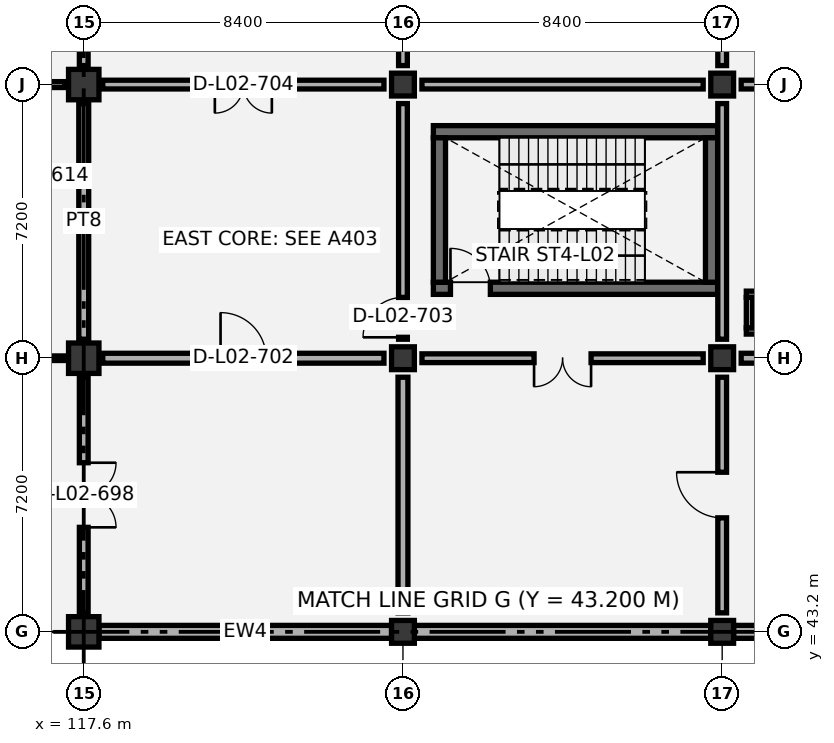
"""IFC4 building model, lengths in metres.
Left out: names, types, materials, properties, quantities, classifications, styles, units other than length and angle.
Written with IfcOpenShell. Run it as: python <this file> out.ifc"""

import sys

from ifc_helpers import new_model, si_unit, direction, frame, frame_2d, origin, origin_2d, place, context, subcontext, project, spatial, rectangle, extrude, element, fill, save


model = new_model("IFC4")
c1 = context("Model", 3, precision=1e-05, world=origin(), true_north=direction((0.0, 1.0)))
c2 = subcontext(c1, "Body", "Model", "MODEL_VIEW")
j1 = project(units=[si_unit("LENGTHUNIT", "METRE"), si_unit("PLANEANGLEUNIT", "RADIAN")], contexts=[c1])
p1 = place(None, origin())
s1 = spatial("IfcSite", under=j1, at=p1, CompositionType="ELEMENT")
p2 = place(p1, origin())
s2 = spatial("IfcBuilding", under=s1, at=p2, CompositionType="ELEMENT")
p3 = place(p2, frame((0.0, 0.0, 11.4)))
s3 = spatial("IfcBuildingStorey", under=s2, at=p3, CompositionType="ELEMENT", Elevation=11.4)
for number, where, z_axis, x_axis in (
    (1, (117.6, 43.2, 0.0), (0.0, 0.0, 1.0), (1.0, 0.0, 0.0)),
    (2, (117.6, 50.4, 0.0), (0.0, 0.0, 1.0), (1.0, 0.0, 0.0)),
    (3, (117.6, 57.6, 0.0), (0.0, 0.0, 1.0), (1.0, 0.0, 0.0)),
):
    element("IfcColumn", number, at=place(p3, frame(where, z_axis=z_axis, x_axis=x_axis)), inside=s3, PredefinedType="COLUMN", context=c2, shape_type="SweptSolid", body=[
        extrude(rectangle(XDim=0.8, YDim=0.8, at=origin_2d()), origin(), (0.0, 0.0, 1.0), 5.4),
    ])
for number, where, z_axis, x_axis in (
    (4, (126.0, 43.2, 0.0), (0.0, 0.0, 1.0), (1.0, 0.0, 0.0)),
    (5, (126.0, 50.4, 0.0), (0.0, 0.0, 1.0), (1.0, 0.0, 0.0)),
    (6, (126.0, 57.6, 0.0), (0.0, 0.0, 1.0), (1.0, 0.0, 0.0)),
    (7, (134.4, 43.2, 0.0), (0.0, 0.0, 1.0), (1.0, 0.0, 0.0)),
    (8, (134.4, 50.4, 0.0), (0.0, 0.0, 1.0), (1.0, 0.0, 0.0)),
    (9, (134.4, 57.6, 0.0), (0.0, 0.0, 1.0), (1.0, 0.0, 0.0)),
):
    element("IfcColumn", number, at=place(p3, frame(where, z_axis=z_axis, x_axis=x_axis)), inside=s3, PredefinedType="COLUMN", context=c2, shape_type="SweptSolid", body=[
        extrude(rectangle(XDim=0.6, YDim=0.6, at=origin_2d()), origin(), (0.0, 0.0, 1.0), 5.4),
    ])
p4 = place(p3, frame((126.8, 52.24, 0.0), z_axis=(0.0, 0.0, 1.0), x_axis=(1.0, 0.0, 0.0)))
e10 = element("IfcWall", 10, at=p4, inside=s3, PredefinedType="SHEAR", context=c2, shape_type="SweptSolid", body=[
    extrude(rectangle(XDim=7.48, YDim=0.32, at=frame_2d((3.74, 0.0))), origin(), (0.0, 0.0, 1.0), 5.1),
])
p5 = place(p4, frame((0.45, 0.0, 0.0)))
e11 = element("IfcOpeningElement", 11, at=p5, cuts=e10, PredefinedType="OPENING", context=c2, shape_type="SweptSolid", body=[
    extrude(rectangle(XDim=1.05, YDim=2.15, at=frame_2d((0.525, 1.075))), frame((0.0, 0.17, 0.0), z_axis=(0.0, -1.0, 0.0), x_axis=(1.0, 0.0, 0.0)), (0.0, 0.0, 1.0), 0.34),
])
p6 = place(p3, frame((126.8, 56.36, 0.0), z_axis=(0.0, 0.0, 1.0), x_axis=(1.0, 0.0, 0.0)))
e12 = element("IfcWall", 12, at=p6, inside=s3, PredefinedType="SHEAR", context=c2, shape_type="SweptSolid", body=[
    extrude(rectangle(XDim=7.48, YDim=0.32, at=frame_2d((3.74, 0.0))), origin(), (0.0, 0.0, 1.0), 5.1),
])
for number, where, z_axis, x_axis in (
    (13, (126.96, 52.4, 0.0), (0.0, 0.0, 1.0), (0.0, 1.0, 0.0)),
    (14, (134.12, 52.4, 0.0), (0.0, 0.0, 1.0), (0.0, 1.0, 0.0)),
):
    element("IfcWall", number, at=place(p3, frame(where, z_axis=z_axis, x_axis=x_axis)), inside=s3, PredefinedType="SHEAR", context=c2, shape_type="SweptSolid", body=[
        extrude(rectangle(XDim=3.8, YDim=0.32, at=frame_2d((1.9, 0.0))), origin(), (0.0, 0.0, 1.0), 5.1),
    ])
p7 = place(p3, frame((118.0, 43.2, 0.0), z_axis=(0.0, 0.0, 1.0), x_axis=(1.0, 0.0, 0.0)))
e15 = element("IfcWall", 15, at=p7, inside=s3, PredefinedType="SOLIDWALL", context=c2, shape_type="SweptSolid", body=[
    extrude(rectangle(XDim=7.7, YDim=0.34, at=frame_2d((3.85, 0.0))), origin(), (0.0, 0.0, 1.0), 4.445),
])
for number, where, z_axis, x_axis in (
    (16, (126.3, 43.2, 0.0), (0.0, 0.0, 1.0), (1.0, 0.0, 0.0)),
    (17, (134.7, 43.2, 0.0), (0.0, 0.0, 1.0), (1.0, 0.0, 0.0)),
):
    element("IfcWall", number, at=place(p3, frame(where, z_axis=z_axis, x_axis=x_axis)), inside=s3, PredefinedType="SOLIDWALL", context=c2, shape_type="SweptSolid", body=[
        extrude(rectangle(XDim=7.8, YDim=0.34, at=frame_2d((3.9, 0.0))), origin(), (0.0, 0.0, 1.0), 4.445),
    ])
for number, where, z_axis, x_axis in (
    (18, (135.035, 51.117, 0.0), (0.0, 0.0, 1.0), (1.0, 0.0, 0.0)),
    (19, (135.035, 52.083, 0.0), (0.0, 0.0, 1.0), (1.0, 0.0, 0.0)),
):
    element("IfcWall", number, at=place(p3, frame(where, z_axis=z_axis, x_axis=x_axis)), inside=s3, PredefinedType="PARTITIONING", context=c2, shape_type="SweptSolid", body=[
        extrude(rectangle(XDim=1.43, YDim=0.165, at=frame_2d((0.715, 0.0))), origin(), (0.0, 0.0, 1.0), 5.1),
    ])
p8 = place(p3, frame((135.117, 51.2, 0.0), z_axis=(0.0, 0.0, 1.0), x_axis=(0.0, 1.0, 0.0)))
e20 = element("IfcWall", 20, at=p8, inside=s3, PredefinedType="PARTITIONING", context=c2, shape_type="SweptSolid", body=[
    extrude(rectangle(XDim=0.8, YDim=0.165, at=frame_2d((0.4, 0.0))), origin(), (0.0, 0.0, 1.0), 5.1),
])
p9 = place(p3, frame((109.35, 55.2, 0.0), z_axis=(0.0, 0.0, 1.0), x_axis=(1.0, 0.0, 0.0)))
e21 = element("IfcWall", 21, at=p9, inside=s3, PredefinedType="PARTITIONING", context=c2, shape_type="SweptSolid", body=[
    extrude(rectangle(XDim=8.1, YDim=0.12, at=frame_2d((4.05, 0.0))), origin(), (0.0, 0.0, 1.0), 5.1),
])
p10 = place(p9, frame((1.08, 0.0, 0.0)))
e22 = element("IfcOpeningElement", 22, at=p10, cuts=e21, PredefinedType="OPENING", context=c2, shape_type="SweptSolid", body=[
    extrude(rectangle(XDim=0.95, YDim=2.1, at=frame_2d((0.475, 1.05))), frame((0.0, 0.07, 0.0), z_axis=(0.0, -1.0, 0.0), x_axis=(1.0, 0.0, 0.0)), (0.0, 0.0, 1.0), 0.14),
])
p11 = place(p9, frame((3.63, 0.0, 0.0)))
e23 = element("IfcOpeningElement", 23, at=p11, cuts=e21, PredefinedType="OPENING", context=c2, shape_type="SweptSolid", body=[
    extrude(rectangle(XDim=0.9, YDim=2.1, at=frame_2d((0.45, 1.05))), frame((0.0, 0.07, 0.0), z_axis=(0.0, -1.0, 0.0), x_axis=(1.0, 0.0, 0.0)), (0.0, 0.0, 1.0), 0.14),
])
p12 = place(p9, frame((6.13, 0.0, 0.0)))
e24 = element("IfcOpeningElement", 24, at=p12, cuts=e21, PredefinedType="OPENING", context=c2, shape_type="SweptSolid", body=[
    extrude(rectangle(XDim=1.0, YDim=2.1, at=frame_2d((0.5, 1.05))), frame((0.0, 0.07, 0.0), z_axis=(0.0, -1.0, 0.0), x_axis=(1.0, 0.0, 0.0)), (0.0, 0.0, 1.0), 0.14),
])
p13 = place(p3, frame((117.6, 43.7, 0.0), z_axis=(0.0, 0.0, 1.0), x_axis=(0.0, 1.0, 0.0)))
e25 = element("IfcWall", 25, at=p13, inside=s3, PredefinedType="PARTITIONING", context=c2, shape_type="SweptSolid", body=[
    extrude(rectangle(XDim=6.2, YDim=0.23, at=frame_2d((3.1, 0.0))), origin(), (0.0, 0.0, 1.0), 4.595),
])
p14 = place(p13, frame((2.25, 0.0, 0.0)))
e26 = element("IfcOpeningElement", 26, at=p14, cuts=e25, PredefinedType="OPENING", context=c2, shape_type="SweptSolid", body=[
    extrude(rectangle(XDim=1.7, YDim=2.25, at=frame_2d((0.85, 1.125))), frame((0.0, 0.125, 0.0), z_axis=(0.0, -1.0, 0.0), x_axis=(1.0, 0.0, 0.0)), (0.0, 0.0, 1.0), 0.25),
])
p15 = place(p3, frame((109.7, 50.4, 0.0), z_axis=(0.0, 0.0, 1.0), x_axis=(1.0, 0.0, 0.0)))
e27 = element("IfcWall", 27, at=p15, inside=s3, PredefinedType="PARTITIONING", context=c2, shape_type="SweptSolid", body=[
    extrude(rectangle(XDim=7.4, YDim=0.12, at=frame_2d((3.7, 0.0))), origin(), (0.0, 0.0, 1.0), 4.345),
])
p16 = place(p3, frame((117.6, 50.9, 0.0), z_axis=(0.0, 0.0, 1.0), x_axis=(0.0, 1.0, 0.0)))
e28 = element("IfcWall", 28, at=p16, inside=s3, PredefinedType="PARTITIONING", context=c2, shape_type="SweptSolid", body=[
    extrude(rectangle(XDim=6.2, YDim=0.26, at=frame_2d((3.1, 0.0))), origin(), (0.0, 0.0, 1.0), 4.395),
])
p17 = place(p3, frame((109.7, 57.6, 0.0), z_axis=(0.0, 0.0, 1.0), x_axis=(1.0, 0.0, 0.0)))
e29 = element("IfcWall", 29, at=p17, inside=s3, PredefinedType="PARTITIONING", context=c2, shape_type="SweptSolid", body=[
    extrude(rectangle(XDim=7.4, YDim=0.155, at=frame_2d((3.7, 0.0))), origin(), (0.0, 0.0, 1.0), 4.345),
])
p18 = place(p17, frame((3.0, 0.0, 0.0)))
e30 = element("IfcOpeningElement", 30, at=p18, cuts=e29, PredefinedType="OPENING", context=c2, shape_type="SweptSolid", body=[
    extrude(rectangle(XDim=1.4, YDim=2.15, at=frame_2d((0.7, 1.075))), frame((0.0, 0.087, 0.0), z_axis=(0.0, -1.0, 0.0), x_axis=(1.0, 0.0, 0.0)), (0.0, 0.0, 1.0), 0.175),
])
p19 = place(p3, frame((117.6, 58.1, 0.0), z_axis=(0.0, 0.0, 1.0), x_axis=(0.0, 1.0, 0.0)))
e31 = element("IfcWall", 31, at=p19, inside=s3, PredefinedType="PARTITIONING", context=c2, shape_type="SweptSolid", body=[
    extrude(rectangle(XDim=6.2, YDim=0.23, at=frame_2d((3.1, 0.0))), origin(), (0.0, 0.0, 1.0), 4.695),
])
p20 = place(p3, frame((126.0, 43.7, 0.0), z_axis=(0.0, 0.0, 1.0), x_axis=(0.0, 1.0, 0.0)))
e32 = element("IfcWall", 32, at=p20, inside=s3, PredefinedType="PARTITIONING", context=c2, shape_type="SweptSolid", body=[
    extrude(rectangle(XDim=6.2, YDim=0.26, at=frame_2d((3.1, 0.0))), origin(), (0.0, 0.0, 1.0), 4.395),
])
p21 = place(p3, frame((118.1, 50.4, 0.0), z_axis=(0.0, 0.0, 1.0), x_axis=(1.0, 0.0, 0.0)))
e33 = element("IfcWall", 33, at=p21, inside=s3, PredefinedType="PARTITIONING", context=c2, shape_type="SweptSolid", body=[
    extrude(rectangle(XDim=7.4, YDim=0.26, at=frame_2d((3.7, 0.0))), origin(), (0.0, 0.0, 1.0), 4.345),
])
p22 = place(p21, frame((3.1, 0.0, 0.0)))
e34 = element("IfcOpeningElement", 34, at=p22, cuts=e33, PredefinedType="OPENING", context=c2, shape_type="SweptSolid", body=[
    extrude(rectangle(XDim=1.2, YDim=2.1, at=frame_2d((0.6, 1.05))), frame((0.0, 0.14, 0.0), z_axis=(0.0, -1.0, 0.0), x_axis=(1.0, 0.0, 0.0)), (0.0, 0.0, 1.0), 0.28),
])
p23 = place(p3, frame((126.0, 50.9, 0.0), z_axis=(0.0, 0.0, 1.0), x_axis=(0.0, 1.0, 0.0)))
e35 = element("IfcWall", 35, at=p23, inside=s3, PredefinedType="PARTITIONING", context=c2, shape_type="SweptSolid", body=[
    extrude(rectangle(XDim=6.2, YDim=0.23, at=frame_2d((3.1, 0.0))), origin(), (0.0, 0.0, 1.0), 4.695),
])
p24 = place(p23, frame((0.05, 0.0, 0.0)))
e36 = element("IfcOpeningElement", 36, at=p24, cuts=e35, PredefinedType="OPENING", context=c2, shape_type="SweptSolid", body=[
    extrude(rectangle(XDim=1.05, YDim=2.15, at=frame_2d((0.525, 1.075))), frame((0.0, 0.125, 0.0), z_axis=(0.0, -1.0, 0.0), x_axis=(1.0, 0.0, 0.0)), (0.0, 0.0, 1.0), 0.25),
])
p25 = place(p3, frame((118.1, 57.6, 0.0), z_axis=(0.0, 0.0, 1.0), x_axis=(1.0, 0.0, 0.0)))
e37 = element("IfcWall", 37, at=p25, inside=s3, PredefinedType="PARTITIONING", context=c2, shape_type="SweptSolid", body=[
    extrude(rectangle(XDim=7.4, YDim=0.23, at=frame_2d((3.7, 0.0))), origin(), (0.0, 0.0, 1.0), 4.345),
])
p26 = place(p25, frame((2.95, 0.0, 0.0)))
e38 = element("IfcOpeningElement", 38, at=p26, cuts=e37, PredefinedType="OPENING", context=c2, shape_type="SweptSolid", body=[
    extrude(rectangle(XDim=1.5, YDim=2.15, at=frame_2d((0.75, 1.075))), frame((0.0, 0.125, 0.0), z_axis=(0.0, -1.0, 0.0), x_axis=(1.0, 0.0, 0.0)), (0.0, 0.0, 1.0), 0.25),
])
p27 = place(p3, frame((126.0, 58.1, 0.0), z_axis=(0.0, 0.0, 1.0), x_axis=(0.0, 1.0, 0.0)))
e39 = element("IfcWall", 39, at=p27, inside=s3, PredefinedType="PARTITIONING", context=c2, shape_type="SweptSolid", body=[
    extrude(rectangle(XDim=6.2, YDim=0.23, at=frame_2d((3.1, 0.0))), origin(), (0.0, 0.0, 1.0), 4.395),
])
p28 = place(p3, frame((134.4, 43.7, 0.0), z_axis=(0.0, 0.0, 1.0), x_axis=(0.0, 1.0, 0.0)))
e40 = element("IfcWall", 40, at=p28, inside=s3, PredefinedType="PARTITIONING", context=c2, shape_type="SweptSolid", body=[
    extrude(rectangle(XDim=6.2, YDim=0.23, at=frame_2d((3.1, 0.0))), origin(), (0.0, 0.0, 1.0), 4.695),
])
p29 = place(p28, frame((2.5, 0.0, 0.0)))
e41 = element("IfcOpeningElement", 41, at=p29, cuts=e40, PredefinedType="OPENING", context=c2, shape_type="SweptSolid", body=[
    extrude(rectangle(XDim=1.2, YDim=2.1, at=frame_2d((0.6, 1.05))), frame((0.0, 0.125, 0.0), z_axis=(0.0, -1.0, 0.0), x_axis=(1.0, 0.0, 0.0)), (0.0, 0.0, 1.0), 0.25),
])
p30 = place(p3, frame((126.5, 50.4, 0.0), z_axis=(0.0, 0.0, 1.0), x_axis=(1.0, 0.0, 0.0)))
e42 = element("IfcWall", 42, at=p30, inside=s3, PredefinedType="PARTITIONING", context=c2, shape_type="SweptSolid", body=[
    extrude(rectangle(XDim=7.4, YDim=0.23, at=frame_2d((3.7, 0.0))), origin(), (0.0, 0.0, 1.0), 4.345),
])
p31 = place(p30, frame((2.95, 0.0, 0.0)))
e43 = element("IfcOpeningElement", 43, at=p31, cuts=e42, PredefinedType="OPENING", context=c2, shape_type="SweptSolid", body=[
    extrude(rectangle(XDim=1.5, YDim=2.15, at=frame_2d((0.75, 1.075))), frame((0.0, 0.125, 0.0), z_axis=(0.0, -1.0, 0.0), x_axis=(1.0, 0.0, 0.0)), (0.0, 0.0, 1.0), 0.25),
])
p32 = place(p3, frame((134.4, 50.9, 0.0), z_axis=(0.0, 0.0, 1.0), x_axis=(0.0, 1.0, 0.0)))
e44 = element("IfcWall", 44, at=p32, inside=s3, PredefinedType="PARTITIONING", context=c2, shape_type="SweptSolid", body=[
    extrude(rectangle(XDim=6.2, YDim=0.23, at=frame_2d((3.1, 0.0))), origin(), (0.0, 0.0, 1.0), 4.395),
])
p33 = place(p3, frame((126.5, 57.6, 0.0), z_axis=(0.0, 0.0, 1.0), x_axis=(1.0, 0.0, 0.0)))
e45 = element("IfcWall", 45, at=p33, inside=s3, PredefinedType="PARTITIONING", context=c2, shape_type="SweptSolid", body=[
    extrude(rectangle(XDim=7.4, YDim=0.23, at=frame_2d((3.7, 0.0))), origin(), (0.0, 0.0, 1.0), 4.345),
])
p34 = place(p3, frame((134.4, 58.1, 0.0), z_axis=(0.0, 0.0, 1.0), x_axis=(0.0, 1.0, 0.0)))
e46 = element("IfcWall", 46, at=p34, inside=s3, PredefinedType="PARTITIONING", context=c2, shape_type="SweptSolid", body=[
    extrude(rectangle(XDim=6.2, YDim=0.23, at=frame_2d((3.1, 0.0))), origin(), (0.0, 0.0, 1.0), 4.805),
])
p35 = place(p3, frame((134.9, 50.4, 0.0), z_axis=(0.0, 0.0, 1.0), x_axis=(1.0, 0.0, 0.0)))
e47 = element("IfcWall", 47, at=p35, inside=s3, PredefinedType="PARTITIONING", context=c2, shape_type="SweptSolid", body=[
    extrude(rectangle(XDim=7.4, YDim=0.26, at=frame_2d((3.7, 0.0))), origin(), (0.0, 0.0, 1.0), 4.345),
])
p36 = place(p3, frame((134.9, 57.6, 0.0), z_axis=(0.0, 0.0, 1.0), x_axis=(1.0, 0.0, 0.0)))
e48 = element("IfcWall", 48, at=p36, inside=s3, PredefinedType="PARTITIONING", context=c2, shape_type="SweptSolid", body=[
    extrude(rectangle(XDim=7.4, YDim=0.23, at=frame_2d((3.7, 0.0))), origin(), (0.0, 0.0, 1.0), 4.345),
])
p37 = place(p36, frame((3.1, 0.0, 0.0)))
e49 = element("IfcOpeningElement", 49, at=p37, cuts=e48, PredefinedType="OPENING", context=c2, shape_type="SweptSolid", body=[
    extrude(rectangle(XDim=1.2, YDim=2.1, at=frame_2d((0.6, 1.05))), frame((0.0, 0.125, 0.0), z_axis=(0.0, -1.0, 0.0), x_axis=(1.0, 0.0, 0.0)), (0.0, 0.0, 1.0), 0.25),
])
p38 = place(p5, origin())
e50 = element("IfcDoor", 50, at=p38, inside=s3, OperationType="SINGLE_SWING_LEFT", PredefinedType="DOOR", context=c2, shape_type="SweptSolid", body=[
    extrude(rectangle(XDim=1.05, YDim=2.15, at=frame_2d((0.525, 1.075))), frame((0.0, 0.025, 0.0), z_axis=(0.0, -1.0, 0.0), x_axis=(1.0, 0.0, 0.0)), (0.0, 0.0, 1.0), 0.05),
])
fill(e11, e50)
p39 = place(p14, frame((1.7, 0.0, 0.0), z_axis=(0.0, 0.0, 1.0), x_axis=(-1.0, 0.0, 0.0)))
e51 = element("IfcDoor", 51, at=p39, inside=s3, OperationType="DOUBLE_DOOR_SINGLE_SWING", PredefinedType="DOOR", context=c2, shape_type="SweptSolid", body=[
    extrude(rectangle(XDim=1.7, YDim=2.25, at=frame_2d((0.85, 1.125))), frame((0.0, 0.025, 0.0), z_axis=(0.0, -1.0, 0.0), x_axis=(1.0, 0.0, 0.0)), (0.0, 0.0, 1.0), 0.05),
])
fill(e26, e51)
p40 = place(p22, origin())
e52 = element("IfcDoor", 52, at=p40, inside=s3, OperationType="SINGLE_SWING_LEFT", PredefinedType="DOOR", context=c2, shape_type="SweptSolid", body=[
    extrude(rectangle(XDim=1.2, YDim=2.1, at=frame_2d((0.6, 1.05))), frame((0.0, 0.025, 0.0), z_axis=(0.0, -1.0, 0.0), x_axis=(1.0, 0.0, 0.0)), (0.0, 0.0, 1.0), 0.05),
])
fill(e34, e52)
p41 = place(p24, origin())
e53 = element("IfcDoor", 53, at=p41, inside=s3, OperationType="SINGLE_SWING_LEFT", PredefinedType="DOOR", context=c2, shape_type="SweptSolid", body=[
    extrude(rectangle(XDim=1.05, YDim=2.15, at=frame_2d((0.525, 1.075))), frame((0.0, 0.025, 0.0), z_axis=(0.0, -1.0, 0.0), x_axis=(1.0, 0.0, 0.0)), (0.0, 0.0, 1.0), 0.05),
])
fill(e36, e53)
p42 = place(p26, frame((1.5, 0.0, 0.0), z_axis=(0.0, 0.0, 1.0), x_axis=(-1.0, 0.0, 0.0)))
e54 = element("IfcDoor", 54, at=p42, inside=s3, OperationType="DOUBLE_DOOR_SINGLE_SWING", PredefinedType="DOOR", context=c2, shape_type="SweptSolid", body=[
    extrude(rectangle(XDim=1.5, YDim=2.15, at=frame_2d((0.75, 1.075))), frame((0.0, 0.025, 0.0), z_axis=(0.0, -1.0, 0.0), x_axis=(1.0, 0.0, 0.0)), (0.0, 0.0, 1.0), 0.05),
])
fill(e38, e54)
p43 = place(p29, origin())
e55 = element("IfcDoor", 55, at=p43, inside=s3, OperationType="SINGLE_SWING_RIGHT", PredefinedType="DOOR", context=c2, shape_type="SweptSolid", body=[
    extrude(rectangle(XDim=1.2, YDim=2.1, at=frame_2d((0.6, 1.05))), frame((0.0, 0.025, 0.0), z_axis=(0.0, -1.0, 0.0), x_axis=(1.0, 0.0, 0.0)), (0.0, 0.0, 1.0), 0.05),
])
fill(e41, e55)
p44 = place(p31, frame((1.5, 0.0, 0.0), z_axis=(0.0, 0.0, 1.0), x_axis=(-1.0, 0.0, 0.0)))
e56 = element("IfcDoor", 56, at=p44, inside=s3, OperationType="DOUBLE_DOOR_SINGLE_SWING", PredefinedType="DOOR", context=c2, shape_type="SweptSolid", body=[
    extrude(rectangle(XDim=1.5, YDim=2.15, at=frame_2d((0.75, 1.075))), frame((0.0, 0.025, 0.0), z_axis=(0.0, -1.0, 0.0), x_axis=(1.0, 0.0, 0.0)), (0.0, 0.0, 1.0), 0.05),
])
fill(e43, e56)
save(model, sys.argv[1])
